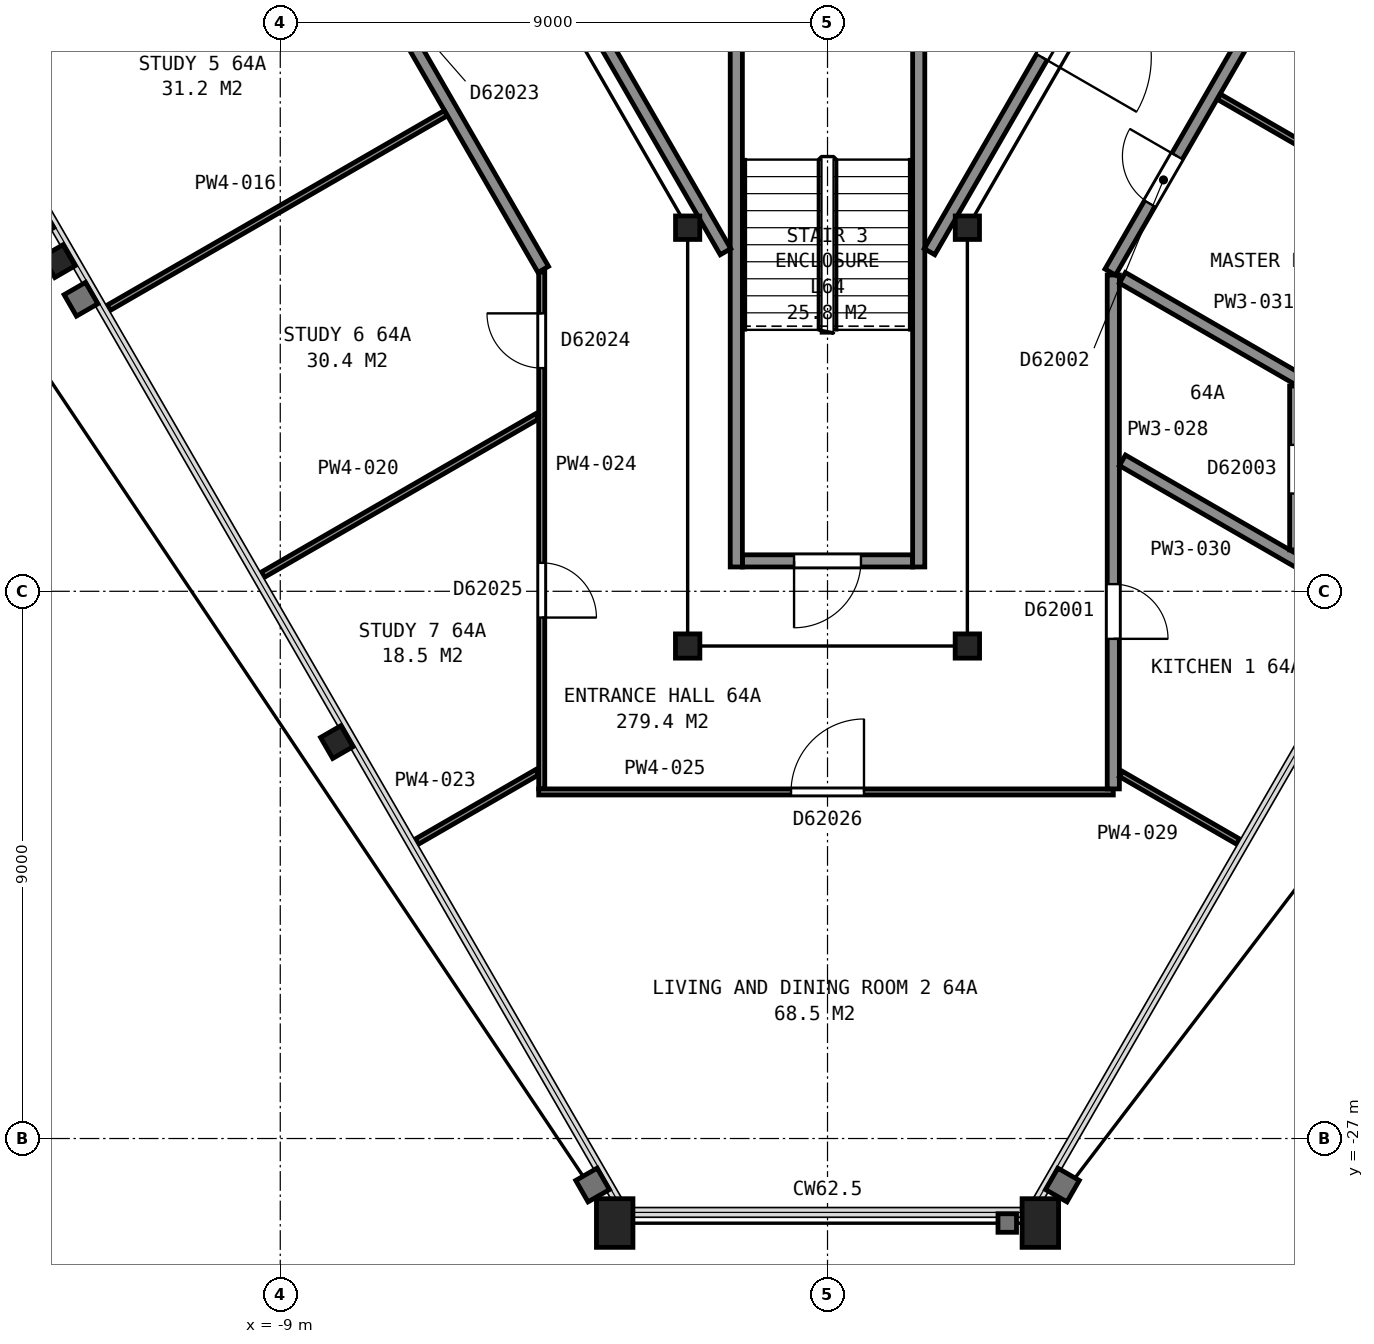
"""IFC4 building model, lengths in metres.
Left out: names, types, materials, properties, quantities, classifications, styles, units other than length and angle.
Written with IfcOpenShell. Run it as: python <this file> out.ifc"""

import sys

from ifc_helpers import new_model, si_unit, direction, frame, frame_2d, origin, origin_2d, place, context, subcontext, project, spatial, rectangle, hollow_rectangle, i_section, extrude, element, fill, save


model = new_model("IFC4")
c1 = context("Model", 3, precision=1e-05, world=origin(), true_north=direction((0.0, 1.0)))
c2 = subcontext(c1, "Body", "Model", "MODEL_VIEW")
j1 = project(units=[si_unit("LENGTHUNIT", "METRE"), si_unit("PLANEANGLEUNIT", "RADIAN")], contexts=[c1])
p1 = place(None, origin())
s1 = spatial("IfcSite", under=j1, at=p1, CompositionType="ELEMENT")
p2 = place(p1, origin())
s2 = spatial("IfcBuilding", under=s1, at=p2, CompositionType="ELEMENT")
p3 = place(p2, frame((0.0, 0.0, 254.5)))
s3 = spatial("IfcBuildingStorey", under=s2, at=p3, CompositionType="ELEMENT", Elevation=254.5)
for number, where, z_axis, x_axis in (
    (1, (-12.64, -12.57, 0.0), (0.0, 0.0, 1.0), (-0.5, 0.866, 0.0)),
    (2, (-8.07, -20.48, 0.0), (0.0, 0.0, 1.0), (-0.5, 0.866, 0.0)),
):
    element("IfcColumn", number, at=place(p3, frame(where, z_axis=z_axis, x_axis=x_axis)), inside=s3, PredefinedType="COLUMN", context=c2, shape_type="SweptSolid", body=[
        extrude(i_section(OverallWidth=0.399, OverallDepth=0.386, WebThickness=0.021, FlangeThickness=0.033, FilletRadius=0.015, at=origin_2d()), origin(), (0.0, 0.0, 1.0), 3.01),
    ])
for number, where, z_axis, x_axis in (
    (3, (-3.5, -28.39, 0.0), (0.0, 0.0, 1.0), (-1.0, 0.0, 0.0)),
    (4, (3.5, -28.39, 0.0), (0.0, 0.0, 1.0), (-1.0, 0.0, 0.0)),
):
    element("IfcColumn", number, at=place(p3, frame(where, z_axis=z_axis, x_axis=x_axis)), inside=s3, PredefinedType="COLUMN", context=c2, shape_type="SweptSolid", body=[
        extrude(hollow_rectangle(XDim=0.6, YDim=0.8, WallThickness=0.05, at=origin_2d()), origin(), (0.0, 0.0, 1.0), 3.7),
    ])
p4 = place(p3, frame((-2.3, -12.02, 0.0), z_axis=(0.0, 0.0, 1.0), x_axis=(1.0, 0.0, 0.0)))
e5 = element("IfcColumn", 5, at=p4, inside=s3, PredefinedType="COLUMN", context=c2, shape_type="SweptSolid", body=[
    extrude(i_section(OverallWidth=0.399, OverallDepth=0.386, WebThickness=0.021, FlangeThickness=0.033, FilletRadius=0.015, at=origin_2d()), origin(), (0.0, 0.0, 1.0), 3.65),
])
for number, where, z_axis, x_axis in (
    (6, (-2.3, -18.9, 0.0), (0.0, 0.0, 1.0), (-1.0, 0.0, 0.0)),
    (7, (2.3, -18.9, 0.0), (0.0, 0.0, 1.0), (-1.0, 0.0, 0.0)),
):
    element("IfcColumn", number, at=place(p3, frame(where, z_axis=z_axis, x_axis=x_axis)), inside=s3, PredefinedType="COLUMN", context=c2, shape_type="SweptSolid", body=[
        extrude(i_section(OverallWidth=0.401, OverallDepth=0.399, WebThickness=0.025, FlangeThickness=0.04, FilletRadius=0.015, at=origin_2d()), origin(), (0.0, 0.0, 1.0), 3.65),
    ])
p5 = place(p3, frame((2.3, -12.02, 0.0), z_axis=(0.0, 0.0, 1.0), x_axis=(1.0, 0.0, 0.0)))
e8 = element("IfcColumn", 8, at=p5, inside=s3, PredefinedType="COLUMN", context=c2, shape_type="SweptSolid", body=[
    extrude(i_section(OverallWidth=0.399, OverallDepth=0.386, WebThickness=0.021, FlangeThickness=0.033, FilletRadius=0.015, at=origin_2d()), origin(), (0.0, 0.0, 1.0), 3.65),
])
p6 = place(p3, frame((-1.4, -17.5, 0.0), z_axis=(0.0, 0.0, 1.0), x_axis=(1.0, 0.0, 0.0)))
e9 = element("IfcWall", 9, at=p6, inside=s3, PredefinedType="PARTITIONING", context=c2, shape_type="SweptSolid", body=[
    extrude(rectangle(XDim=2.8, YDim=0.2, at=frame_2d((1.4, 0.0))), origin(), (0.0, 0.0, 1.0), 3.45),
])
p7 = place(p6, frame((0.85, 0.0, 0.0)))
e10 = element("IfcOpeningElement", 10, at=p7, cuts=e9, PredefinedType="OPENING", context=c2, shape_type="SweptSolid", body=[
    extrude(rectangle(XDim=1.1, YDim=2.1, at=frame_2d((0.55, 1.05))), frame((0.0, 0.11, 0.0), z_axis=(0.0, -1.0, 0.0), x_axis=(1.0, 0.0, 0.0)), (0.0, 0.0, 1.0), 0.22),
])
for number, where, z_axis, x_axis in (
    (11, (1.5, -8.0, 0.0), (0.0, 0.0, 1.0), (0.0, -1.0, 0.0)),
    (12, (-1.5, -8.0, 0.0), (0.0, 0.0, 1.0), (0.0, -1.0, 0.0)),
):
    element("IfcWall", number, at=place(p3, frame(where, z_axis=z_axis, x_axis=x_axis)), inside=s3, PredefinedType="PARTITIONING", context=c2, shape_type="SweptSolid", body=[
        extrude(rectangle(XDim=9.6, YDim=0.2, at=frame_2d((4.8, 0.0))), origin(), (0.0, 0.0, 1.0), 3.45),
    ])
p8 = place(p3, frame((-4.655, -7.257, 0.0), z_axis=(0.0, 0.0, 1.0), x_axis=(0.499966124405, -0.866044960985, 0.0)))
e13 = element("IfcWall", 13, at=p8, inside=s3, PredefinedType="PARTITIONING", context=c2, shape_type="SweptSolid", body=[
    extrude(rectangle(XDim=5.956, YDim=0.2, at=frame_2d((2.978, 0.0))), origin(), (0.0, 0.0, 1.0), 3.45),
])
p9 = place(p3, frame((1.677, -12.415, 0.0), z_axis=(0.0, 0.0, 1.0), x_axis=(0.500054337157, 0.865994029939, 0.0)))
e14 = element("IfcWall", 14, at=p9, inside=s3, PredefinedType="PARTITIONING", context=c2, shape_type="SweptSolid", body=[
    extrude(rectangle(XDim=6.177, YDim=0.2, at=frame_2d((3.088, 0.0))), origin(), (0.0, 0.0, 1.0), 3.45),
])
p10 = place(p9, frame((3.695, 0.0, 0.0)))
e15 = element("IfcOpeningElement", 15, at=p10, cuts=e14, PredefinedType="OPENING", context=c2, shape_type="SweptSolid", body=[
    extrude(rectangle(XDim=1.8, YDim=2.1, at=frame_2d((0.9, 1.05))), frame((0.0, 0.11, 0.0), z_axis=(0.0, -1.0, 0.0), x_axis=(1.0, 0.0, 0.0)), (0.0, 0.0, 1.0), 0.22),
])
p11 = place(p3, frame((-4.675, -12.706, 0.0), z_axis=(0.0, 0.0, 1.0), x_axis=(-0.499972470324, 0.866041297467, 0.0)))
e16 = element("IfcWall", 16, at=p11, inside=s3, PredefinedType="PARTITIONING", context=c2, shape_type="SweptSolid", body=[
    extrude(rectangle(XDim=17.385, YDim=0.2, at=frame_2d((8.692, 0.0))), origin(), (0.0, 0.0, 1.0), 2.362),
])
p12 = place(p11, frame((14.57, 0.0, 0.0)))
e17 = element("IfcOpeningElement", 17, at=p12, cuts=e16, PredefinedType="OPENING", context=c2, shape_type="SweptSolid", body=[
    extrude(rectangle(XDim=0.9, YDim=2.1, at=frame_2d((0.45, 1.05))), frame((0.0, 0.11, 0.0), z_axis=(0.0, -1.0, 0.0), x_axis=(1.0, 0.0, 0.0)), (0.0, 0.0, 1.0), 0.22),
])
p13 = place(p11, frame((11.777, 0.0, 0.0)))
e18 = element("IfcOpeningElement", 18, at=p13, cuts=e16, PredefinedType="OPENING", context=c2, shape_type="SweptSolid", body=[
    extrude(rectangle(XDim=0.9, YDim=2.1, at=frame_2d((0.45, 1.05))), frame((0.0, 0.11, 0.0), z_axis=(0.0, -1.0, 0.0), x_axis=(1.0, 0.0, 0.0)), (0.0, 0.0, 1.0), 0.22),
])
p14 = place(p11, frame((5.095, 0.0, 0.0)))
e19 = element("IfcOpeningElement", 19, at=p14, cuts=e16, PredefinedType="OPENING", context=c2, shape_type="SweptSolid", body=[
    extrude(rectangle(XDim=0.9, YDim=2.1, at=frame_2d((0.45, 1.05))), frame((0.0, 0.11, 0.0), z_axis=(0.0, -1.0, 0.0), x_axis=(1.0, 0.0, 0.0)), (0.0, 0.0, 1.0), 0.22),
])
p15 = place(p3, frame((-11.821, -13.337, 0.0), z_axis=(0.0, 0.0, 1.0), x_axis=(0.866013405822, 0.500020780506, 0.0)))
e20 = element("IfcWall", 20, at=p15, inside=s3, PredefinedType="PARTITIONING", context=c2, shape_type="SweptSolid", body=[
    extrude(rectangle(XDim=6.399, YDim=0.1, at=frame_2d((3.2, 0.0))), origin(), (0.0, 0.0, 1.0), 2.362),
])
p16 = place(p3, frame((-9.286, -17.727, 0.0), z_axis=(0.0, 0.0, 1.0), x_axis=(0.865990461678, 0.50006051662, 0.0)))
e21 = element("IfcWall", 21, at=p16, inside=s3, PredefinedType="PARTITIONING", context=c2, shape_type="SweptSolid", body=[
    extrude(rectangle(XDim=5.209, YDim=0.1, at=frame_2d((2.604, 0.0))), origin(), (0.0, 0.0, 1.0), 2.362),
])
p17 = place(p3, frame((-6.752, -22.116, 0.0), z_axis=(0.0, 0.0, 1.0), x_axis=(0.866135723987, 0.499808871103, 0.0)))
e22 = element("IfcWall", 22, at=p17, inside=s3, PredefinedType="PARTITIONING", context=c2, shape_type="SweptSolid", body=[
    extrude(rectangle(XDim=2.283, YDim=0.1, at=frame_2d((1.141, 0.0))), origin(), (0.0, 0.0, 1.0), 2.362),
])
p18 = place(p3, frame((-4.7, -21.25, 0.0), z_axis=(0.0, 0.0, 1.0), x_axis=(0.0, 1.0, 0.0)))
e23 = element("IfcWall", 23, at=p18, inside=s3, PredefinedType="PARTITIONING", context=c2, shape_type="SweptSolid", body=[
    extrude(rectangle(XDim=8.502, YDim=0.1, at=frame_2d((4.251, 0.0))), origin(), (0.0, 0.0, 1.0), 2.362),
])
p19 = place(p18, frame((6.921, 0.0, 0.0)))
e24 = element("IfcOpeningElement", 24, at=p19, cuts=e23, PredefinedType="OPENING", context=c2, shape_type="SweptSolid", body=[
    extrude(rectangle(XDim=0.9, YDim=2.1, at=frame_2d((0.45, 1.05))), frame((0.0, 0.06, 0.0), z_axis=(0.0, -1.0, 0.0), x_axis=(1.0, 0.0, 0.0)), (0.0, 0.0, 1.0), 0.12),
])
p20 = place(p18, frame((2.818, 0.0, 0.0)))
e25 = element("IfcOpeningElement", 25, at=p20, cuts=e23, PredefinedType="OPENING", context=c2, shape_type="SweptSolid", body=[
    extrude(rectangle(XDim=0.9, YDim=2.1, at=frame_2d((0.45, 1.05))), frame((0.0, 0.06, 0.0), z_axis=(0.0, -1.0, 0.0), x_axis=(1.0, 0.0, 0.0)), (0.0, 0.0, 1.0), 0.12),
])
p21 = place(p3, frame((4.7, -21.3, 0.0), z_axis=(0.0, 0.0, 1.0), x_axis=(-1.0, 0.0, 0.0)))
e26 = element("IfcWall", 26, at=p21, inside=s3, PredefinedType="PARTITIONING", context=c2, shape_type="SweptSolid", body=[
    extrude(rectangle(XDim=9.45, YDim=0.1, at=frame_2d((4.725, 0.0))), origin(), (0.0, 0.0, 1.0), 2.362),
])
p22 = place(p21, frame((4.1, 0.0, 0.0)))
e27 = element("IfcOpeningElement", 27, at=p22, cuts=e26, PredefinedType="OPENING", context=c2, shape_type="SweptSolid", body=[
    extrude(rectangle(XDim=1.2, YDim=2.1, at=frame_2d((0.6, 1.05))), frame((0.0, 0.06, 0.0), z_axis=(0.0, -1.0, 0.0), x_axis=(1.0, 0.0, 0.0)), (0.0, 0.0, 1.0), 0.12),
])
p23 = place(p3, frame((4.7, -12.798, 0.0), z_axis=(0.0, 0.0, 1.0), x_axis=(0.0, -1.0, 0.0)))
e28 = element("IfcWall", 28, at=p23, inside=s3, PredefinedType="PARTITIONING", context=c2, shape_type="SweptSolid", body=[
    extrude(rectangle(XDim=8.452, YDim=0.2, at=frame_2d((4.226, 0.0))), origin(), (0.0, 0.0, 1.0), 2.362),
])
p24 = place(p23, frame((5.084, 0.0, 0.0)))
e29 = element("IfcOpeningElement", 29, at=p24, cuts=e28, PredefinedType="OPENING", context=c2, shape_type="SweptSolid", body=[
    extrude(rectangle(XDim=0.9, YDim=2.1, at=frame_2d((0.45, 1.05))), frame((0.0, 0.11, 0.0), z_axis=(0.0, -1.0, 0.0), x_axis=(1.0, 0.0, 0.0)), (0.0, 0.0, 1.0), 0.22),
])
p25 = place(p3, frame((4.825, -21.004, 0.0), z_axis=(0.0, 0.0, 1.0), x_axis=(0.866121639155, -0.499833278392, 0.0)))
e30 = element("IfcWall", 30, at=p25, inside=s3, PredefinedType="PARTITIONING", context=c2, shape_type="SweptSolid", body=[
    extrude(rectangle(XDim=2.225, YDim=0.1, at=frame_2d((1.112, 0.0))), origin(), (0.0, 0.0, 1.0), 2.362),
])
p26 = place(p3, frame((4.85, -15.846, 0.0), z_axis=(0.0, 0.0, 1.0), x_axis=(0.866007055173, -0.500031779381, 0.0)))
e31 = element("IfcWall", 31, at=p26, inside=s3, PredefinedType="PARTITIONING", context=c2, shape_type="SweptSolid", body=[
    extrude(rectangle(XDim=4.782, YDim=0.2, at=frame_2d((2.391, 0.0))), origin(), (0.0, 0.0, 1.0), 2.362),
])
p27 = place(p3, frame((4.85, -12.844, 0.0), z_axis=(0.0, 0.0, 1.0), x_axis=(0.866005731893, -0.500034071167, 0.0)))
e32 = element("IfcWall", 32, at=p27, inside=s3, PredefinedType="PARTITIONING", context=c2, shape_type="SweptSolid", body=[
    extrude(rectangle(XDim=3.391, YDim=0.2, at=frame_2d((1.695, 0.0))), origin(), (0.0, 0.0, 1.0), 2.362),
])
p28 = place(p3, frame((13.342, 2.306, 0.0), z_axis=(0.0, 0.0, 1.0), x_axis=(-0.499983003136, -0.866035216706, 0.0)))
e33 = element("IfcWall", 33, at=p28, inside=s3, PredefinedType="PARTITIONING", context=c2, shape_type="SweptSolid", body=[
    extrude(rectangle(XDim=17.385, YDim=0.2, at=frame_2d((8.692, 0.0))), origin(), (0.0, 0.0, 1.0), 2.362),
])
p29 = place(p28, frame((15.185, 0.0, 0.0)))
e34 = element("IfcOpeningElement", 34, at=p29, cuts=e33, PredefinedType="OPENING", context=c2, shape_type="SweptSolid", body=[
    extrude(rectangle(XDim=0.9, YDim=2.1, at=frame_2d((0.45, 1.05))), frame((0.0, 0.11, 0.0), z_axis=(0.0, -1.0, 0.0), x_axis=(1.0, 0.0, 0.0)), (0.0, 0.0, 1.0), 0.22),
])
p30 = place(p28, frame((12.094, 0.0, 0.0)))
e35 = element("IfcOpeningElement", 35, at=p30, cuts=e33, PredefinedType="OPENING", context=c2, shape_type="SweptSolid", body=[
    extrude(rectangle(XDim=0.9, YDim=2.1, at=frame_2d((0.45, 1.05))), frame((0.0, 0.11, 0.0), z_axis=(0.0, -1.0, 0.0), x_axis=(1.0, 0.0, 0.0)), (0.0, 0.0, 1.0), 0.22),
])
p31 = place(p28, frame((5.867, 0.0, 0.0)))
e36 = element("IfcOpeningElement", 36, at=p31, cuts=e33, PredefinedType="OPENING", context=c2, shape_type="SweptSolid", body=[
    extrude(rectangle(XDim=0.9, YDim=2.1, at=frame_2d((0.45, 1.05))), frame((0.0, 0.11, 0.0), z_axis=(0.0, -1.0, 0.0), x_axis=(1.0, 0.0, 0.0)), (0.0, 0.0, 1.0), 0.22),
])
p32 = place(p28, frame((1.392, 0.0, 0.0)))
e37 = element("IfcOpeningElement", 37, at=p32, cuts=e33, PredefinedType="OPENING", context=c2, shape_type="SweptSolid", body=[
    extrude(rectangle(XDim=0.9, YDim=2.1, at=frame_2d((0.45, 1.05))), frame((0.0, 0.11, 0.0), z_axis=(0.0, -1.0, 0.0), x_axis=(1.0, 0.0, 0.0)), (0.0, 0.0, 1.0), 0.22),
])
p33 = place(p3, frame((6.436, -9.865, 0.0), z_axis=(0.0, 0.0, 1.0), x_axis=(0.866013405822, -0.500020780506, 0.0)))
e38 = element("IfcWall", 38, at=p33, inside=s3, PredefinedType="PARTITIONING", context=c2, shape_type="SweptSolid", body=[
    extrude(rectangle(XDim=6.399, YDim=0.1, at=frame_2d((3.2, 0.0))), origin(), (0.0, 0.0, 1.0), 2.362),
])
p34 = place(p3, frame((7.7, -17.319, 0.0), z_axis=(0.0, 0.0, 1.0), x_axis=(0.0, 1.0, 0.0)))
e39 = element("IfcWall", 39, at=p34, inside=s3, PredefinedType="PARTITIONING", context=c2, shape_type="SweptSolid", body=[
    extrude(rectangle(XDim=2.695, YDim=0.2, at=frame_2d((1.347, 0.0))), origin(), (0.0, 0.0, 1.0), 2.362),
])
p35 = place(p34, frame((0.927, 0.0, 0.0)))
e40 = element("IfcOpeningElement", 40, at=p35, cuts=e39, PredefinedType="OPENING", context=c2, shape_type="SweptSolid", body=[
    extrude(rectangle(XDim=0.8, YDim=2.1, at=frame_2d((0.4, 1.05))), frame((0.0, 0.11, 0.0), z_axis=(0.0, -1.0, 0.0), x_axis=(1.0, 0.0, 0.0)), (0.0, 0.0, 1.0), 0.22),
])
p36 = place(p7, origin())
e41 = element("IfcDoor", 41, at=p36, inside=s3, OperationType="SINGLE_SWING_LEFT", PredefinedType="DOOR", context=c2, shape_type="SweptSolid", body=[
    extrude(rectangle(XDim=1.1, YDim=2.1, at=frame_2d((0.55, 1.05))), frame((0.0, 0.025, 0.0), z_axis=(0.0, -1.0, 0.0), x_axis=(1.0, 0.0, 0.0)), (0.0, 0.0, 1.0), 0.05),
])
fill(e10, e41)
p37 = place(p10, origin())
e42 = element("IfcDoor", 42, at=p37, inside=s3, OperationType="DOUBLE_DOOR_SINGLE_SWING", PredefinedType="DOOR", context=c2, shape_type="SweptSolid", body=[
    extrude(rectangle(XDim=1.8, YDim=2.1, at=frame_2d((0.9, 1.05))), frame((0.0, 0.025, 0.0), z_axis=(0.0, -1.0, 0.0), x_axis=(1.0, 0.0, 0.0)), (0.0, 0.0, 1.0), 0.05),
])
fill(e15, e42)
p38 = place(p19, origin())
e43 = element("IfcDoor", 43, at=p38, inside=s3, OperationType="SINGLE_SWING_RIGHT", PredefinedType="DOOR", context=c2, shape_type="SweptSolid", body=[
    extrude(rectangle(XDim=0.9, YDim=2.1, at=frame_2d((0.45, 1.05))), frame((0.0, 0.025, 0.0), z_axis=(0.0, -1.0, 0.0), x_axis=(1.0, 0.0, 0.0)), (0.0, 0.0, 1.0), 0.05),
])
fill(e24, e43)
p39 = place(p20, origin())
e44 = element("IfcDoor", 44, at=p39, inside=s3, OperationType="SINGLE_SWING_LEFT", PredefinedType="DOOR", context=c2, shape_type="SweptSolid", body=[
    extrude(rectangle(XDim=0.9, YDim=2.1, at=frame_2d((0.45, 1.05))), frame((0.0, 0.025, 0.0), z_axis=(0.0, -1.0, 0.0), x_axis=(1.0, 0.0, 0.0)), (0.0, 0.0, 1.0), 0.05),
])
fill(e25, e44)
p40 = place(p22, origin())
e45 = element("IfcDoor", 45, at=p40, inside=s3, OperationType="SINGLE_SWING_LEFT", PredefinedType="DOOR", context=c2, shape_type="SweptSolid", body=[
    extrude(rectangle(XDim=1.2, YDim=2.1, at=frame_2d((0.6, 1.05))), frame((0.0, 0.025, 0.0), z_axis=(0.0, -1.0, 0.0), x_axis=(1.0, 0.0, 0.0)), (0.0, 0.0, 1.0), 0.05),
])
fill(e27, e45)
p41 = place(p24, origin())
e46 = element("IfcDoor", 46, at=p41, inside=s3, OperationType="SINGLE_SWING_RIGHT", PredefinedType="DOOR", context=c2, shape_type="SweptSolid", body=[
    extrude(rectangle(XDim=0.9, YDim=2.1, at=frame_2d((0.45, 1.05))), frame((0.0, 0.025, 0.0), z_axis=(0.0, -1.0, 0.0), x_axis=(1.0, 0.0, 0.0)), (0.0, 0.0, 1.0), 0.05),
])
fill(e29, e46)
p42 = place(p29, origin())
e47 = element("IfcDoor", 47, at=p42, inside=s3, OperationType="SINGLE_SWING_LEFT", PredefinedType="DOOR", context=c2, shape_type="SweptSolid", body=[
    extrude(rectangle(XDim=0.9, YDim=2.1, at=frame_2d((0.45, 1.05))), frame((0.0, 0.025, 0.0), z_axis=(0.0, -1.0, 0.0), x_axis=(1.0, 0.0, 0.0)), (0.0, 0.0, 1.0), 0.05),
])
fill(e34, e47)
p43 = place(p35, origin())
e48 = element("IfcDoor", 48, at=p43, inside=s3, OperationType="SINGLE_SWING_LEFT", PredefinedType="DOOR", context=c2, shape_type="SweptSolid", body=[
    extrude(rectangle(XDim=0.8, YDim=2.1, at=frame_2d((0.4, 1.05))), frame((0.0, 0.025, 0.0), z_axis=(0.0, -1.0, 0.0), x_axis=(1.0, 0.0, 0.0)), (0.0, 0.0, 1.0), 0.05),
])
fill(e40, e48)
save(model, sys.argv[1])
